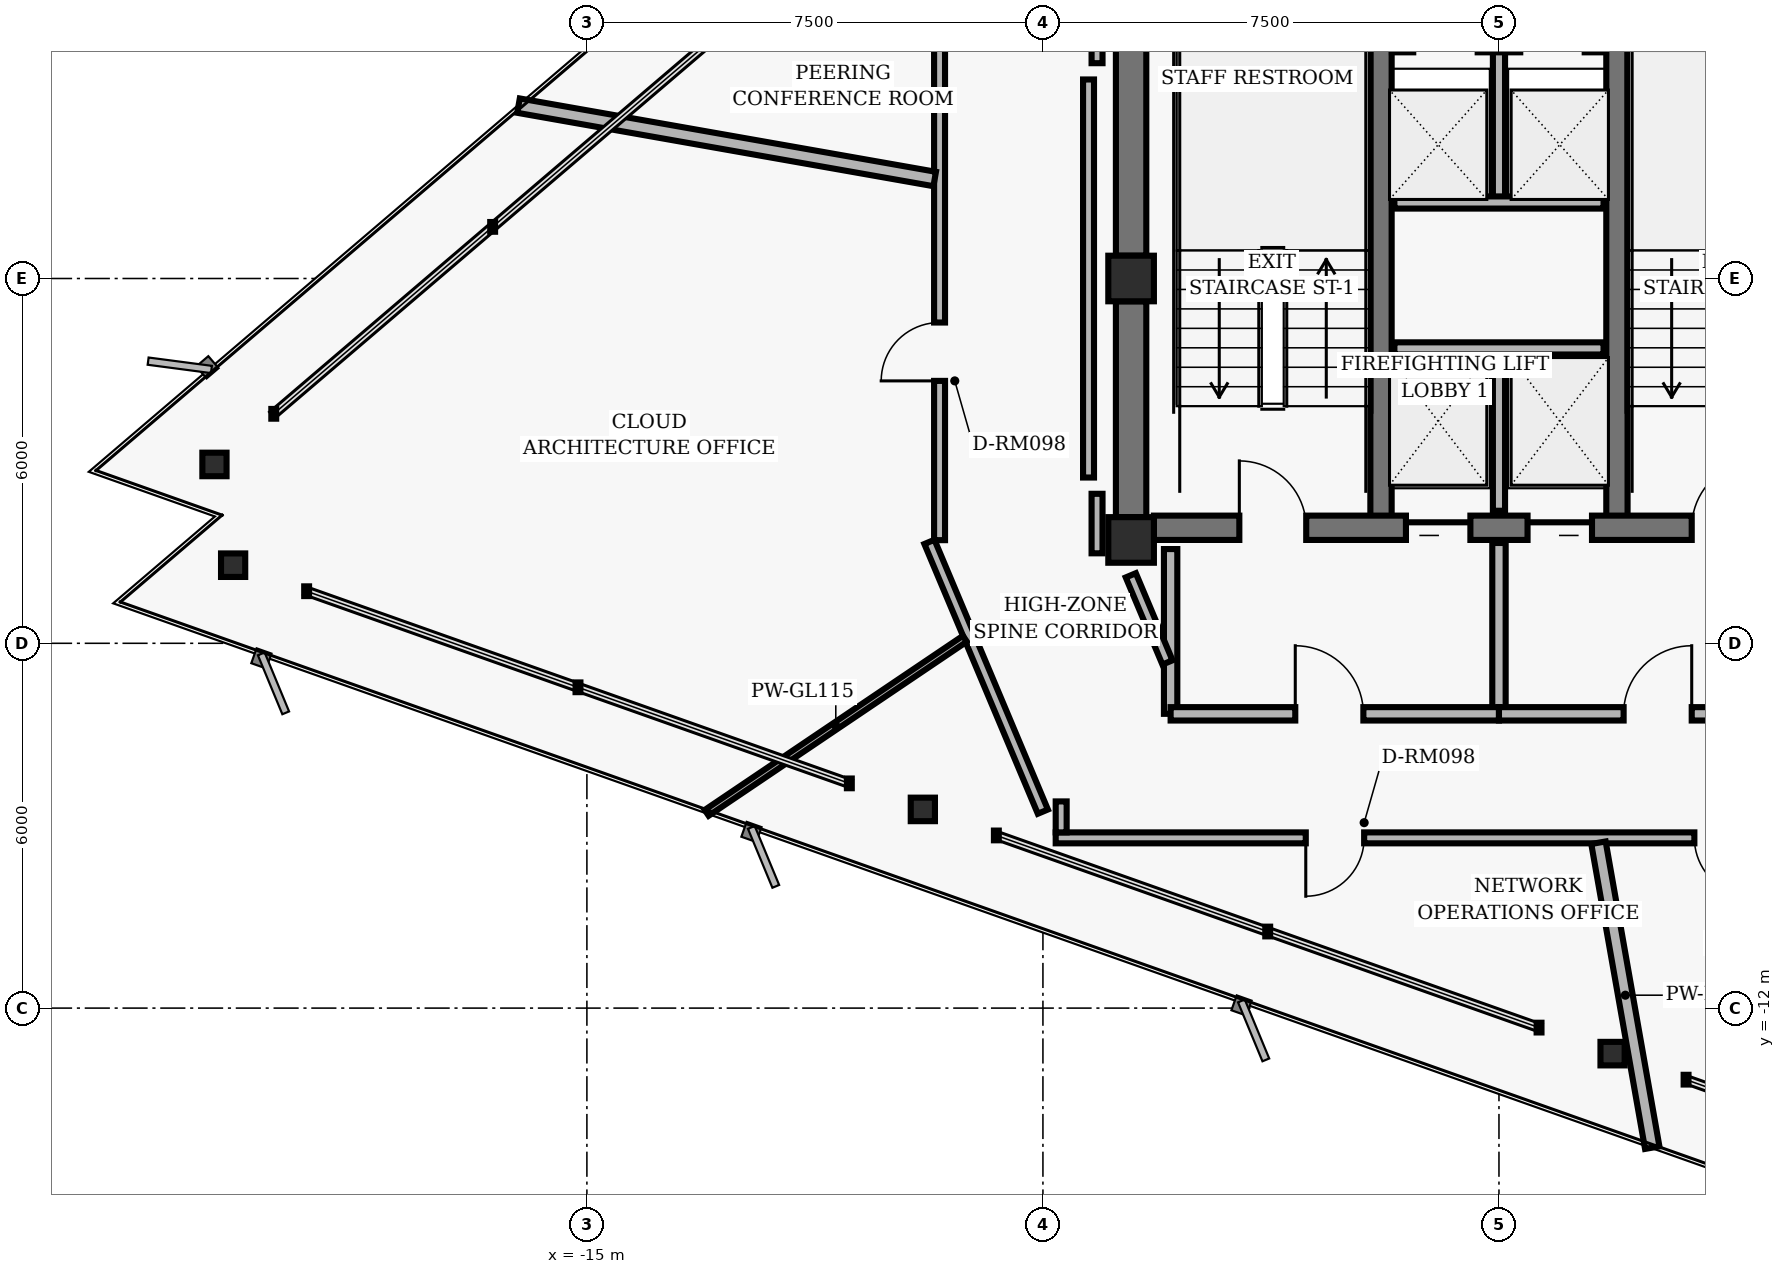
"""IFC4 building model, lengths in metres.
Left out: names, types, materials, properties, quantities, classifications, styles, units other than length and angle.
Written with IfcOpenShell. Run it as: python <this file> out.ifc"""

import sys

from ifc_helpers import new_model, si_unit, direction, frame, frame_2d, origin, origin_2d, place, context, subcontext, project, spatial, rectangle, hollow_rectangle, i_section, extrude, element, fill, save


model = new_model("IFC4")
c1 = context("Model", 3, precision=1e-05, world=origin(), true_north=direction((0.0, 1.0)))
c2 = subcontext(c1, "Body", "Model", "MODEL_VIEW")
j1 = project(units=[si_unit("LENGTHUNIT", "METRE"), si_unit("PLANEANGLEUNIT", "RADIAN")], contexts=[c1])
p1 = place(None, origin())
s1 = spatial("IfcSite", under=j1, at=p1, CompositionType="ELEMENT")
p2 = place(p1, origin())
s2 = spatial("IfcBuilding", under=s1, at=p2, CompositionType="ELEMENT")
p3 = place(p2, frame((0.0, 0.0, 184.48)))
s3 = spatial("IfcBuildingStorey", under=s2, at=p3, CompositionType="ELEMENT", Elevation=184.48)
for number, where, z_axis, x_axis in (
    (1, (-6.05, 0.0, 0.0), (0.0, 0.0, 1.0), (1.0, 0.0, 0.0)),
    (2, (-6.05, -4.3, 0.0), (0.0, 0.0, 1.0), (1.0, 0.0, 0.0)),
):
    element("IfcColumn", number, at=place(p3, frame(where, z_axis=z_axis, x_axis=x_axis)), inside=s3, PredefinedType="COLUMN", context=c2, shape_type="SweptSolid", body=[
        extrude(hollow_rectangle(XDim=0.75, YDim=0.75, WallThickness=0.05, InnerFilletRadius=0.02, OuterFilletRadius=0.04, at=origin_2d()), origin(), (0.0, 0.0, 1.0), 3.04),
    ])
p4 = place(p3, frame((-6.05, 0.375, 0.0), z_axis=(0.0, 0.0, 1.0), x_axis=(0.0, 1.0, 0.0)))
e3 = element("IfcWall", 3, at=p4, inside=s3, PredefinedType="SHEAR", context=c2, shape_type="SweptSolid", body=[
    extrude(rectangle(XDim=3.75, YDim=0.5, at=frame_2d((1.875, 0.0))), origin(), (0.0, 0.0, 1.0), 2.798),
])
p5 = place(p3, frame((-6.05, -3.925, 0.0), z_axis=(0.0, 0.0, 1.0), x_axis=(0.0, 1.0, 0.0)))
e4 = element("IfcWall", 4, at=p5, inside=s3, PredefinedType="SHEAR", context=c2, shape_type="SweptSolid", body=[
    extrude(rectangle(XDim=3.55, YDim=0.5, at=frame_2d((1.775, 0.0))), origin(), (0.0, 0.0, 1.0), 2.798),
])
for number, where, z_axis, x_axis in (
    (5, (-1.94, -4.1, 0.0), (0.0, 0.0, 1.0), (0.0, 1.0, 0.0)),
    (6, (1.94, -4.1, 0.0), (0.0, 0.0, 1.0), (0.0, 1.0, 0.0)),
):
    element("IfcWall", number, at=place(p3, frame(where, z_axis=z_axis, x_axis=x_axis)), inside=s3, PredefinedType="SHEAR", context=c2, shape_type="SweptSolid", body=[
        extrude(rectangle(XDim=8.2, YDim=0.35, at=frame_2d((4.1, 0.0))), origin(), (0.0, 0.0, 1.0), 2.798),
    ])
p6 = place(p3, frame((-5.675, -4.1, 0.0), z_axis=(0.0, 0.0, 1.0), x_axis=(1.0, 0.0, 0.0)))
e7 = element("IfcWall", 7, at=p6, inside=s3, PredefinedType="SHEAR", context=c2, shape_type="SweptSolid", body=[
    extrude(rectangle(XDim=11.35, YDim=0.4, at=frame_2d((5.675, 0.0))), origin(), (0.0, 0.0, 1.0), 2.798),
])
p7 = place(p6, frame((1.405, 0.0, 0.0)))
e8 = element("IfcOpeningElement", 8, at=p7, cuts=e7, PredefinedType="OPENING", context=c2, shape_type="SweptSolid", body=[
    extrude(rectangle(XDim=1.1, YDim=2.04, at=frame_2d((0.55, 1.02))), frame((0.0, 0.21, 0.0), z_axis=(0.0, -1.0, 0.0), x_axis=(1.0, 0.0, 0.0)), (0.0, 0.0, 1.0), 0.42),
])
p8 = place(p6, frame((8.845, 0.0, 0.0)))
e9 = element("IfcOpeningElement", 9, at=p8, cuts=e7, PredefinedType="OPENING", context=c2, shape_type="SweptSolid", body=[
    extrude(rectangle(XDim=1.1, YDim=2.04, at=frame_2d((0.55, 1.02))), frame((0.0, 0.21, 0.0), z_axis=(0.0, -1.0, 0.0), x_axis=(1.0, 0.0, 0.0)), (0.0, 0.0, 1.0), 0.42),
])
p9 = place(p6, frame((4.145, 0.0, 0.0)))
e10 = element("IfcOpeningElement", 10, at=p9, cuts=e7, PredefinedType="OPENING", context=c2, shape_type="SweptSolid", body=[
    extrude(rectangle(XDim=1.06, YDim=2.04, at=frame_2d((0.53, 1.02))), frame((0.0, 0.21, 0.0), z_axis=(0.0, -1.0, 0.0), x_axis=(1.0, 0.0, 0.0)), (0.0, 0.0, 1.0), 0.42),
])
p10 = place(p6, frame((6.145, 0.0, 0.0)))
e11 = element("IfcOpeningElement", 11, at=p10, cuts=e7, PredefinedType="OPENING", context=c2, shape_type="SweptSolid", body=[
    extrude(rectangle(XDim=1.06, YDim=2.04, at=frame_2d((0.53, 1.02))), frame((0.0, 0.21, 0.0), z_axis=(0.0, -1.0, 0.0), x_axis=(1.0, 0.0, 0.0)), (0.0, 0.0, 1.0), 0.42),
])
for number, where, z_axis, x_axis in (
    (12, (-21.125, -3.059, 0.0), (0.0, 0.0, 1.0), (1.0, 0.0, 0.0)),
    (13, (-20.818, -4.715, 0.0), (0.0, 0.0, 1.0), (1.0, 0.0, 0.0)),
    (14, (-9.475, -8.732, 0.0), (0.0, 0.0, 1.0), (1.0, 0.0, 0.0)),
    (15, (1.868, -12.749, 0.0), (0.0, 0.0, 1.0), (1.0, 0.0, 0.0)),
):
    element("IfcColumn", number, at=place(p3, frame(where, z_axis=z_axis, x_axis=x_axis)), inside=s3, PredefinedType="COLUMN", context=c2, shape_type="SweptSolid", body=[
        extrude(i_section(OverallWidth=0.398, OverallDepth=0.387, WebThickness=0.021, FlangeThickness=0.033, FilletRadius=0.018, at=origin_2d()), origin(), (0.0, 0.0, 1.0), 3.04),
    ])
p11 = place(p3, frame((0.0, -3.82, 0.0), z_axis=(0.0, 0.0, 1.0), x_axis=(0.0, 1.0, 0.0)))
e16 = element("IfcWall", 16, at=p11, inside=s3, PredefinedType="PARTITIONING", context=c2, shape_type="SweptSolid", body=[
    extrude(rectangle(XDim=2.67, YDim=0.2, at=frame_2d((1.335, 0.0))), origin(), (0.0, 0.0, 1.0), 2.773),
])
p12 = place(p3, frame((-1.72, -1.15, 0.0), z_axis=(0.0, 0.0, 1.0), x_axis=(1.0, 0.0, 0.0)))
e17 = element("IfcWall", 17, at=p12, inside=s3, PredefinedType="PARTITIONING", context=c2, shape_type="SweptSolid", body=[
    extrude(rectangle(XDim=3.44, YDim=0.2, at=frame_2d((1.72, 0.0))), origin(), (0.0, 0.0, 1.0), 2.773),
])
p13 = place(p3, frame((-5.4, -7.16, 0.0), z_axis=(0.0, 0.0, 1.0), x_axis=(0.0, 1.0, 0.0)))
e18 = element("IfcWall", 18, at=p13, inside=s3, PredefinedType="PARTITIONING", context=c2, shape_type="SweptSolid", body=[
    extrude(rectangle(XDim=2.71, YDim=0.22, at=frame_2d((1.355, 0.0))), origin(), (0.0, 0.0, 1.0), 2.773),
])
p14 = place(p3, frame((0.0, -7.16, 0.0), z_axis=(0.0, 0.0, 1.0), x_axis=(0.0, 1.0, 0.0)))
e19 = element("IfcWall", 19, at=p14, inside=s3, PredefinedType="PARTITIONING", context=c2, shape_type="SweptSolid", body=[
    extrude(rectangle(XDim=2.81, YDim=0.22, at=frame_2d((1.405, 0.0))), origin(), (0.0, 0.0, 1.0), 2.773),
])
p15 = place(p3, frame((-5.4, -7.16, 0.0), z_axis=(0.0, 0.0, 1.0), x_axis=(1.0, 0.0, 0.0)))
e20 = element("IfcWall", 20, at=p15, inside=s3, PredefinedType="PARTITIONING", context=c2, shape_type="SweptSolid", body=[
    extrude(rectangle(XDim=5.4, YDim=0.22, at=frame_2d((2.7, 0.0))), origin(), (0.0, 0.0, 1.0), 2.395),
])
p16 = place(p15, frame((2.05, 0.0, 0.0)))
e21 = element("IfcOpeningElement", 21, at=p16, cuts=e20, PredefinedType="OPENING", context=c2, shape_type="SweptSolid", body=[
    extrude(rectangle(XDim=1.12, YDim=2.02, at=frame_2d((0.56, 1.01))), frame((0.0, 0.12, 0.0), z_axis=(0.0, -1.0, 0.0), x_axis=(1.0, 0.0, 0.0)), (0.0, 0.0, 1.0), 0.24),
])
p17 = place(p3, frame((0.0, -7.16, 0.0), z_axis=(0.0, 0.0, 1.0), x_axis=(1.0, 0.0, 0.0)))
e22 = element("IfcWall", 22, at=p17, inside=s3, PredefinedType="PARTITIONING", context=c2, shape_type="SweptSolid", body=[
    extrude(rectangle(XDim=5.4, YDim=0.22, at=frame_2d((2.7, 0.0))), origin(), (0.0, 0.0, 1.0), 2.395),
])
p18 = place(p17, frame((2.05, 0.0, 0.0)))
e23 = element("IfcOpeningElement", 23, at=p18, cuts=e22, PredefinedType="OPENING", context=c2, shape_type="SweptSolid", body=[
    extrude(rectangle(XDim=1.12, YDim=2.02, at=frame_2d((0.56, 1.01))), frame((0.0, 0.12, 0.0), z_axis=(0.0, -1.0, 0.0), x_axis=(1.0, 0.0, 0.0)), (0.0, 0.0, 1.0), 0.24),
])
p19 = place(p3, frame((0.0, 1.25, 0.0), z_axis=(0.0, 0.0, 1.0), x_axis=(0.0, 1.0, 0.0)))
e24 = element("IfcWall", 24, at=p19, inside=s3, PredefinedType="PARTITIONING", context=c2, shape_type="SweptSolid", body=[
    extrude(rectangle(XDim=2.77, YDim=0.2, at=frame_2d((1.385, 0.0))), origin(), (0.0, 0.0, 1.0), 2.773),
])
p20 = place(p3, frame((-1.72, 1.25, 0.0), z_axis=(0.0, 0.0, 1.0), x_axis=(1.0, 0.0, 0.0)))
e25 = element("IfcWall", 25, at=p20, inside=s3, PredefinedType="PARTITIONING", context=c2, shape_type="SweptSolid", body=[
    extrude(rectangle(XDim=3.44, YDim=0.2, at=frame_2d((1.72, 0.0))), origin(), (0.0, 0.0, 1.0), 2.773),
])
p21 = place(p3, frame((-1.76, 3.82, 0.0), z_axis=(0.0, 0.0, 1.0), x_axis=(1.0, 0.0, 0.0)))
e26 = element("IfcWall", 26, at=p21, inside=s3, PredefinedType="PARTITIONING", context=c2, shape_type="SweptSolid", body=[
    extrude(rectangle(XDim=3.52, YDim=0.2, at=frame_2d((1.76, 0.0))), origin(), (0.0, 0.0, 1.0), 2.773),
])
p22 = place(p21, frame((0.35, 0.0, 0.0)))
e27 = element("IfcOpeningElement", 27, at=p22, cuts=e26, PredefinedType="OPENING", context=c2, shape_type="SweptSolid", body=[
    extrude(rectangle(XDim=1.06, YDim=2.04, at=frame_2d((0.53, 1.02))), frame((0.0, 0.11, 0.0), z_axis=(0.0, -1.0, 0.0), x_axis=(1.0, 0.0, 0.0)), (0.0, 0.0, 1.0), 0.22),
])
p23 = place(p21, frame((2.11, 0.0, 0.0)))
e28 = element("IfcOpeningElement", 28, at=p23, cuts=e26, PredefinedType="OPENING", context=c2, shape_type="SweptSolid", body=[
    extrude(rectangle(XDim=1.06, YDim=2.04, at=frame_2d((0.53, 1.02))), frame((0.0, 0.11, 0.0), z_axis=(0.0, -1.0, 0.0), x_axis=(1.0, 0.0, 0.0)), (0.0, 0.0, 1.0), 0.22),
])
p24 = place(p3, frame((-7.501, -8.769, 0.0), z_axis=(0.0, 0.0, 1.0), x_axis=(-0.387573945081, 0.921838617706, 0.0)))
e29 = element("IfcWall", 29, at=p24, inside=s3, PredefinedType="PARTITIONING", context=c2, shape_type="SweptSolid", body=[
    extrude(rectangle(XDim=4.813, YDim=0.18, at=frame_2d((2.407, 0.0))), origin(), (0.0, 0.0, 1.0), 2.773),
])
p25 = place(p3, frame((-9.2, -4.303, 0.0), z_axis=(0.0, 0.0, 1.0), x_axis=(0.0, 1.0, 0.0)))
e30 = element("IfcWall", 30, at=p25, inside=s3, PredefinedType="PARTITIONING", context=c2, shape_type="SweptSolid", body=[
    extrude(rectangle(XDim=8.607, YDim=0.18, at=frame_2d((4.303, 0.0))), origin(), (0.0, 0.0, 1.0), 2.773),
])
p26 = place(p25, frame((2.619, 0.0, 0.0)))
e31 = element("IfcOpeningElement", 31, at=p26, cuts=e30, PredefinedType="OPENING", context=c2, shape_type="SweptSolid", body=[
    extrude(rectangle(XDim=0.96, YDim=2.02, at=frame_2d((0.48, 1.01))), frame((0.0, 0.1, 0.0), z_axis=(0.0, -1.0, 0.0), x_axis=(1.0, 0.0, 0.0)), (0.0, 0.0, 1.0), 0.2),
])
p27 = place(p3, frame((-6.61, 4.94, 0.0), z_axis=(0.0, 0.0, 1.0), x_axis=(0.0, -1.0, 0.0)))
e32 = element("IfcWall", 32, at=p27, inside=s3, PredefinedType="PARTITIONING", context=c2, shape_type="SweptSolid", body=[
    extrude(rectangle(XDim=1.399, YDim=0.18, at=frame_2d((0.699, 0.0))), origin(), (0.0, 0.0, 1.0), 2.773),
])
p28 = place(p3, frame((-6.75, 3.273, 0.0), z_axis=(0.0, 0.0, 1.0), x_axis=(0.0, -1.0, 0.0)))
e33 = element("IfcWall", 33, at=p28, inside=s3, PredefinedType="PARTITIONING", context=c2, shape_type="SweptSolid", body=[
    extrude(rectangle(XDim=6.547, YDim=0.18, at=frame_2d((3.273, 0.0))), origin(), (0.0, 0.0, 1.0), 2.773),
])
p29 = place(p3, frame((-6.61, -3.541, 0.0), z_axis=(0.0, 0.0, 1.0), x_axis=(0.0, -1.0, 0.0)))
e34 = element("IfcWall", 34, at=p29, inside=s3, PredefinedType="PARTITIONING", context=c2, shape_type="SweptSolid", body=[
    extrude(rectangle(XDim=0.979, YDim=0.18, at=frame_2d((0.489, 0.0))), origin(), (0.0, 0.0, 1.0), 2.773),
])
p30 = place(p3, frame((-6.055, -4.882, 0.0), z_axis=(0.0, 0.0, 1.0), x_axis=(0.387579540458, -0.921836265189, 0.0)))
e35 = element("IfcWall", 35, at=p30, inside=s3, PredefinedType="PARTITIONING", context=c2, shape_type="SweptSolid", body=[
    extrude(rectangle(XDim=1.555, YDim=0.18, at=frame_2d((0.777, 0.0))), origin(), (0.0, 0.0, 1.0), 2.773),
])
p31 = place(p3, frame((6.01, -9.2, 0.0), z_axis=(0.0, 0.0, 1.0), x_axis=(-1.0, 0.0, 0.0)))
e36 = element("IfcWall", 36, at=p31, inside=s3, PredefinedType="PARTITIONING", context=c2, shape_type="SweptSolid", body=[
    extrude(rectangle(XDim=13.3, YDim=0.18, at=frame_2d((6.65, 0.0))), origin(), (0.0, 0.0, 1.0), 2.395),
])
p32 = place(p31, frame((8.227, 0.0, 0.0)))
e37 = element("IfcOpeningElement", 37, at=p32, cuts=e36, PredefinedType="OPENING", context=c2, shape_type="SweptSolid", body=[
    extrude(rectangle(XDim=0.96, YDim=2.02, at=frame_2d((0.48, 1.01))), frame((0.0, 0.1, 0.0), z_axis=(0.0, -1.0, 0.0), x_axis=(1.0, 0.0, 0.0)), (0.0, 0.0, 1.0), 0.2),
])
p33 = place(p31, frame((1.836, 0.0, 0.0)))
e38 = element("IfcOpeningElement", 38, at=p33, cuts=e36, PredefinedType="OPENING", context=c2, shape_type="SweptSolid", body=[
    extrude(rectangle(XDim=0.96, YDim=2.02, at=frame_2d((0.48, 1.01))), frame((0.0, 0.1, 0.0), z_axis=(0.0, -1.0, 0.0), x_axis=(1.0, 0.0, 0.0)), (0.0, 0.0, 1.0), 0.2),
])
p34 = place(p3, frame((-7.2, -9.11, 0.0), z_axis=(0.0, 0.0, 1.0), x_axis=(0.0, 1.0, 0.0)))
e39 = element("IfcWall", 39, at=p34, inside=s3, PredefinedType="PARTITIONING", context=c2, shape_type="SweptSolid", body=[
    extrude(rectangle(XDim=0.51, YDim=0.18, at=frame_2d((0.255, 0.0))), origin(), (0.0, 0.0, 1.0), 2.773),
])
p35 = place(p3, frame((-8.784, -5.925, 0.0), z_axis=(0.0, 0.0, 1.0), x_axis=(-0.829060822753, -0.559158432089, 0.0)))
e40 = element("IfcWall", 40, at=p35, inside=s3, PredefinedType="MOVABLE", context=c2, shape_type="SweptSolid", body=[
    extrude(rectangle(XDim=5.122, YDim=0.115, at=frame_2d((2.561, 0.0))), origin(), (0.0, 0.0, 1.0), 2.773),
])
p36 = place(p3, frame((1.636, -9.28, 0.0), z_axis=(0.0, 0.0, 1.0), x_axis=(0.173634919368, -0.984810090716, 0.0)))
e41 = element("IfcWall", 41, at=p36, inside=s3, PredefinedType="PARTITIONING", context=c2, shape_type="SweptSolid", body=[
    extrude(rectangle(XDim=5.093, YDim=0.24, at=frame_2d((2.546, 0.0))), origin(), (0.0, 0.0, 1.0), 2.773),
])
p37 = place(p3, frame((-9.28, 1.636, 0.0), z_axis=(0.0, 0.0, 1.0), x_axis=(-0.984803709336, 0.173671108934, 0.0)))
e42 = element("IfcWall", 42, at=p37, inside=s3, PredefinedType="PARTITIONING", context=c2, shape_type="SweptSolid", body=[
    extrude(rectangle(XDim=6.95, YDim=0.24, at=frame_2d((3.475, 0.0))), origin(), (0.0, 0.0, 1.0), 2.773),
])
p38 = place(p7, origin())
e43 = element("IfcDoor", 43, at=p38, inside=s3, OperationType="SINGLE_SWING_LEFT", PredefinedType="DOOR", context=c2, shape_type="SweptSolid", body=[
    extrude(rectangle(XDim=1.1, YDim=2.04, at=frame_2d((0.55, 1.02))), frame((0.0, 0.025, 0.0), z_axis=(0.0, -1.0, 0.0), x_axis=(1.0, 0.0, 0.0)), (0.0, 0.0, 1.0), 0.05),
])
fill(e8, e43)
p39 = place(p8, origin())
e44 = element("IfcDoor", 44, at=p39, inside=s3, OperationType="SINGLE_SWING_RIGHT", PredefinedType="DOOR", context=c2, shape_type="SweptSolid", body=[
    extrude(rectangle(XDim=1.1, YDim=2.04, at=frame_2d((0.55, 1.02))), frame((0.0, 0.025, 0.0), z_axis=(0.0, -1.0, 0.0), x_axis=(1.0, 0.0, 0.0)), (0.0, 0.0, 1.0), 0.05),
])
fill(e9, e44)
p40 = place(p9, origin())
e45 = element("IfcDoor", 45, at=p40, inside=s3, OperationType="SLIDING_TO_LEFT", PredefinedType="DOOR", context=c2, shape_type="SweptSolid", body=[
    extrude(rectangle(XDim=1.06, YDim=2.04, at=frame_2d((0.53, 1.02))), frame((0.0, 0.025, 0.0), z_axis=(0.0, -1.0, 0.0), x_axis=(1.0, 0.0, 0.0)), (0.0, 0.0, 1.0), 0.05),
])
fill(e10, e45)
p41 = place(p10, origin())
e46 = element("IfcDoor", 46, at=p41, inside=s3, OperationType="SLIDING_TO_RIGHT", PredefinedType="DOOR", context=c2, shape_type="SweptSolid", body=[
    extrude(rectangle(XDim=1.06, YDim=2.04, at=frame_2d((0.53, 1.02))), frame((0.0, 0.025, 0.0), z_axis=(0.0, -1.0, 0.0), x_axis=(1.0, 0.0, 0.0)), (0.0, 0.0, 1.0), 0.05),
])
fill(e11, e46)
p42 = place(p16, origin())
e47 = element("IfcDoor", 47, at=p42, inside=s3, OperationType="SINGLE_SWING_LEFT", PredefinedType="DOOR", context=c2, shape_type="SweptSolid", body=[
    extrude(rectangle(XDim=1.12, YDim=2.02, at=frame_2d((0.56, 1.01))), frame((0.0, 0.025, 0.0), z_axis=(0.0, -1.0, 0.0), x_axis=(1.0, 0.0, 0.0)), (0.0, 0.0, 1.0), 0.05),
])
fill(e21, e47)
p43 = place(p18, origin())
e48 = element("IfcDoor", 48, at=p43, inside=s3, OperationType="SINGLE_SWING_RIGHT", PredefinedType="DOOR", context=c2, shape_type="SweptSolid", body=[
    extrude(rectangle(XDim=1.12, YDim=2.02, at=frame_2d((0.56, 1.01))), frame((0.0, 0.025, 0.0), z_axis=(0.0, -1.0, 0.0), x_axis=(1.0, 0.0, 0.0)), (0.0, 0.0, 1.0), 0.05),
])
fill(e23, e48)
p44 = place(p26, origin())
e49 = element("IfcDoor", 49, at=p44, inside=s3, OperationType="SINGLE_SWING_LEFT", PredefinedType="DOOR", context=c2, shape_type="SweptSolid", body=[
    extrude(rectangle(XDim=0.96, YDim=2.02, at=frame_2d((0.48, 1.01))), frame((0.0, 0.025, 0.0), z_axis=(0.0, -1.0, 0.0), x_axis=(1.0, 0.0, 0.0)), (0.0, 0.0, 1.0), 0.05),
])
fill(e31, e49)
p45 = place(p32, origin())
e50 = element("IfcDoor", 50, at=p45, inside=s3, OperationType="SINGLE_SWING_RIGHT", PredefinedType="DOOR", context=c2, shape_type="SweptSolid", body=[
    extrude(rectangle(XDim=0.96, YDim=2.02, at=frame_2d((0.48, 1.01))), frame((0.0, 0.025, 0.0), z_axis=(0.0, -1.0, 0.0), x_axis=(1.0, 0.0, 0.0)), (0.0, 0.0, 1.0), 0.05),
])
fill(e37, e50)
p46 = place(p33, origin())
e51 = element("IfcDoor", 51, at=p46, inside=s3, OperationType="SINGLE_SWING_LEFT", PredefinedType="DOOR", context=c2, shape_type="SweptSolid", body=[
    extrude(rectangle(XDim=0.96, YDim=2.02, at=frame_2d((0.48, 1.01))), frame((0.0, 0.025, 0.0), z_axis=(0.0, -1.0, 0.0), x_axis=(1.0, 0.0, 0.0)), (0.0, 0.0, 1.0), 0.05),
])
fill(e38, e51)
save(model, sys.argv[1])
